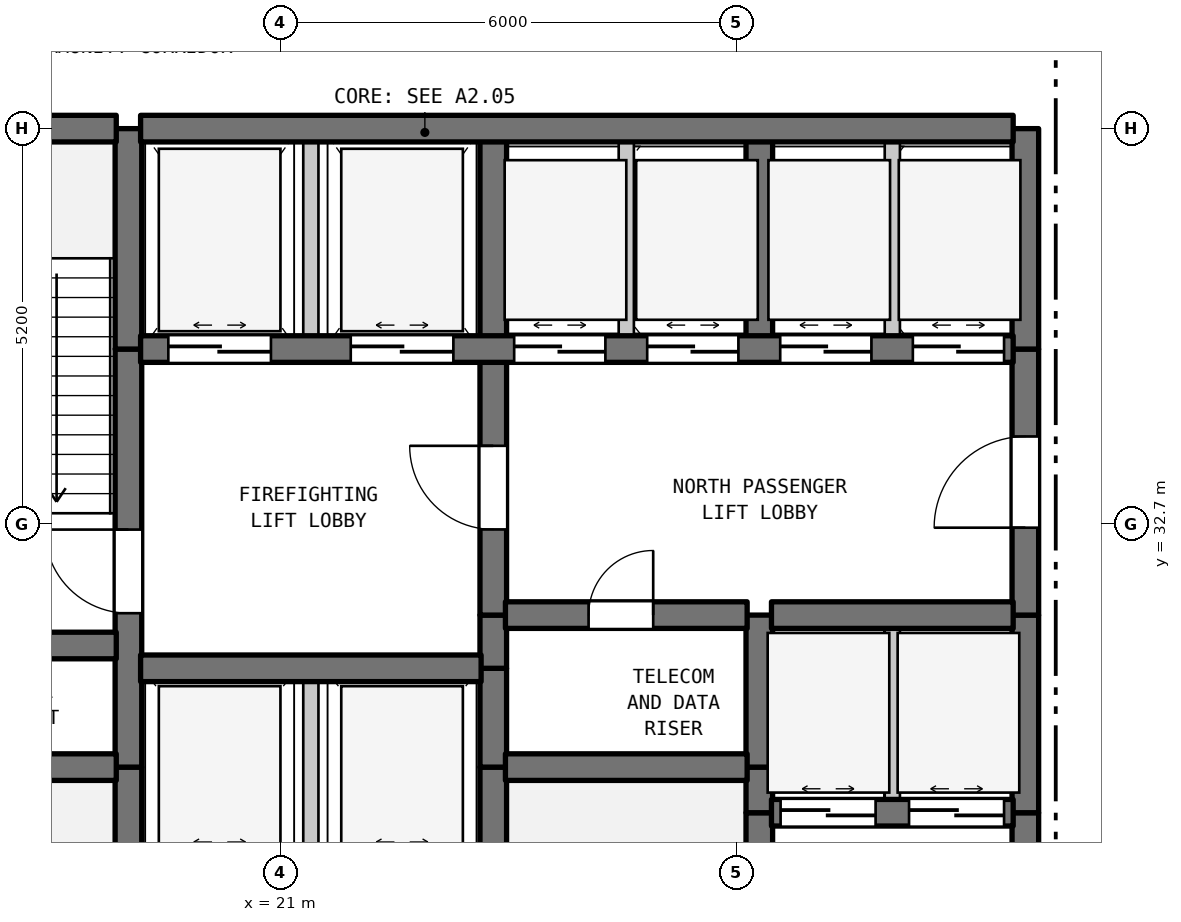
"""IFC4 building model, lengths in metres.
Left out: names, types, materials, properties, quantities, classifications, styles, units other than length and angle.
Written with IfcOpenShell. Run it as: python <this file> out.ifc"""

import sys

from ifc_helpers import new_model, si_unit, direction, frame, frame_2d, origin, place, context, subcontext, project, spatial, rectangle, extrude, element, fill, save


model = new_model("IFC4")
c1 = context("Model", 3, precision=1e-05, world=origin(), true_north=direction((0.0, 1.0)))
c2 = subcontext(c1, "Body", "Model", "MODEL_VIEW")
j1 = project(units=[si_unit("LENGTHUNIT", "METRE"), si_unit("PLANEANGLEUNIT", "RADIAN")], contexts=[c1])
p1 = place(None, origin())
s1 = spatial("IfcSite", under=j1, at=p1, CompositionType="ELEMENT")
p2 = place(p1, origin())
s2 = spatial("IfcBuilding", under=s1, at=p2, CompositionType="ELEMENT")
p3 = place(p2, frame((0.0, 0.0, 19.0)))
s3 = spatial("IfcBuildingStorey", under=s2, at=p3, CompositionType="ELEMENT", Elevation=19.0)
p4 = place(p3, frame((19.0, 28.2, 0.0), z_axis=(0.0, 0.0, 1.0), x_axis=(0.0, 1.0, 0.0)))
e1 = element("IfcWall", 1, at=p4, inside=s3, PredefinedType="SHEAR", context=c2, shape_type="SweptSolid", body=[
    extrude(rectangle(XDim=1.3, YDim=0.35, at=frame_2d((0.65, 0.0))), origin(), (0.0, 0.0, 1.0), 4.685),
])
p5 = place(p3, frame((19.0, 29.5, 0.0), z_axis=(0.0, 0.0, 1.0), x_axis=(0.0, 1.0, 0.0)))
e2 = element("IfcWall", 2, at=p5, inside=s3, PredefinedType="SHEAR", context=c2, shape_type="SweptSolid", body=[
    extrude(rectangle(XDim=5.5, YDim=0.35, at=frame_2d((2.75, 0.0))), origin(), (0.0, 0.0, 1.0), 4.685),
])
p6 = place(p5, frame((2.025, 0.0, 0.0)))
e3 = element("IfcOpeningElement", 3, at=p6, cuts=e2, PredefinedType="OPENING", context=c2, shape_type="SweptSolid", body=[
    extrude(rectangle(XDim=1.1, YDim=2.15, at=frame_2d((0.55, 1.075))), frame((0.0, 0.185, 0.0), z_axis=(0.0, -1.0, 0.0), x_axis=(1.0, 0.0, 0.0)), (0.0, 0.0, 1.0), 0.37),
])
p7 = place(p3, frame((19.0, 35.0, 0.0), z_axis=(0.0, 0.0, 1.0), x_axis=(0.0, 1.0, 0.0)))
e4 = element("IfcWall", 4, at=p7, inside=s3, PredefinedType="SHEAR", context=c2, shape_type="SweptSolid", body=[
    extrude(rectangle(XDim=2.9, YDim=0.35, at=frame_2d((1.45, 0.0))), origin(), (0.0, 0.0, 1.0), 4.685),
])
p8 = place(p3, frame((21.4, 28.2, 0.0), z_axis=(0.0, 0.0, 1.0), x_axis=(0.0, 1.0, 0.0)))
e5 = element("IfcWall", 5, at=p8, inside=s3, PredefinedType="STANDARD", context=c2, shape_type="SweptSolid", body=[
    extrude(rectangle(XDim=2.6, YDim=0.2, at=frame_2d((1.3, 0.0))), origin(), (0.0, 0.0, 1.0), 4.685),
])
p9 = place(p3, frame((21.4, 35.0, 0.0), z_axis=(0.0, 0.0, 1.0), x_axis=(0.0, 1.0, 0.0)))
e6 = element("IfcWall", 6, at=p9, inside=s3, PredefinedType="STANDARD", context=c2, shape_type="SweptSolid", body=[
    extrude(rectangle(XDim=2.9, YDim=0.2, at=frame_2d((1.45, 0.0))), origin(), (0.0, 0.0, 1.0), 4.685),
])
for number, where, z_axis, x_axis in (
    (7, (23.8, 28.2, 0.0), (0.0, 0.0, 1.0), (0.0, 1.0, 0.0)),
    (8, (23.8, 29.5, 0.0), (0.0, 0.0, 1.0), (0.0, 1.0, 0.0)),
):
    element("IfcWall", number, at=place(p3, frame(where, z_axis=z_axis, x_axis=x_axis)), inside=s3, PredefinedType="SHEAR", context=c2, shape_type="SweptSolid", body=[
        extrude(rectangle(XDim=1.3, YDim=0.35, at=frame_2d((0.65, 0.0))), origin(), (0.0, 0.0, 1.0), 4.685),
    ])
p10 = place(p3, frame((23.8, 30.8, 0.0), z_axis=(0.0, 0.0, 1.0), x_axis=(0.0, 1.0, 0.0)))
e9 = element("IfcWall", 9, at=p10, inside=s3, PredefinedType="SHEAR", context=c2, shape_type="SweptSolid", body=[
    extrude(rectangle(XDim=0.7, YDim=0.35, at=frame_2d((0.35, 0.0))), origin(), (0.0, 0.0, 1.0), 4.685),
])
p11 = place(p3, frame((23.8, 31.5, 0.0), z_axis=(0.0, 0.0, 1.0), x_axis=(0.0, 1.0, 0.0)))
e10 = element("IfcWall", 10, at=p11, inside=s3, PredefinedType="SHEAR", context=c2, shape_type="SweptSolid", body=[
    extrude(rectangle(XDim=3.5, YDim=0.35, at=frame_2d((1.75, 0.0))), origin(), (0.0, 0.0, 1.0), 4.685),
])
p12 = place(p11, frame((1.127, 0.0, 0.0)))
e11 = element("IfcOpeningElement", 11, at=p12, cuts=e10, PredefinedType="OPENING", context=c2, shape_type="SweptSolid", body=[
    extrude(rectangle(XDim=1.1, YDim=2.15, at=frame_2d((0.55, 1.075))), frame((0.0, 0.185, 0.0), z_axis=(0.0, -1.0, 0.0), x_axis=(1.0, 0.0, 0.0)), (0.0, 0.0, 1.0), 0.37),
])
p13 = place(p3, frame((23.8, 35.0, 0.0), z_axis=(0.0, 0.0, 1.0), x_axis=(0.0, 1.0, 0.0)))
e12 = element("IfcWall", 12, at=p13, inside=s3, PredefinedType="SHEAR", context=c2, shape_type="SweptSolid", body=[
    extrude(rectangle(XDim=2.9, YDim=0.35, at=frame_2d((1.45, 0.0))), origin(), (0.0, 0.0, 1.0), 4.685),
])
p14 = place(p3, frame((25.55, 35.0, 0.0), z_axis=(0.0, 0.0, 1.0), x_axis=(0.0, 1.0, 0.0)))
e13 = element("IfcWall", 13, at=p14, inside=s3, PredefinedType="STANDARD", context=c2, shape_type="SweptSolid", body=[
    extrude(rectangle(XDim=2.9, YDim=0.2, at=frame_2d((1.45, 0.0))), origin(), (0.0, 0.0, 1.0), 4.685),
])
p15 = place(p3, frame((27.3, 25.6, 0.0), z_axis=(0.0, 0.0, 1.0), x_axis=(0.0, 1.0, 0.0)))
e14 = element("IfcWall", 14, at=p15, inside=s3, PredefinedType="SHEAR", context=c2, shape_type="SweptSolid", body=[
    extrude(rectangle(XDim=3.3, YDim=0.35, at=frame_2d((1.65, 0.0))), origin(), (0.0, 0.0, 1.0), 4.685),
])
p16 = place(p3, frame((27.3, 28.9, 0.0), z_axis=(0.0, 0.0, 1.0), x_axis=(0.0, 1.0, 0.0)))
e15 = element("IfcWall", 15, at=p16, inside=s3, PredefinedType="SHEAR", context=c2, shape_type="SweptSolid", body=[
    extrude(rectangle(XDim=0.6, YDim=0.35, at=frame_2d((0.3, 0.0))), origin(), (0.0, 0.0, 1.0), 4.685),
])
p17 = place(p3, frame((27.3, 29.5, 0.0), z_axis=(0.0, 0.0, 1.0), x_axis=(0.0, 1.0, 0.0)))
e16 = element("IfcWall", 16, at=p17, inside=s3, PredefinedType="SHEAR", context=c2, shape_type="SweptSolid", body=[
    extrude(rectangle(XDim=2.0, YDim=0.35, at=frame_2d((1.0, 0.0))), origin(), (0.0, 0.0, 1.0), 4.685),
])
p18 = place(p3, frame((27.3, 35.0, 0.0), z_axis=(0.0, 0.0, 1.0), x_axis=(0.0, 1.0, 0.0)))
e17 = element("IfcWall", 17, at=p18, inside=s3, PredefinedType="SHEAR", context=c2, shape_type="SweptSolid", body=[
    extrude(rectangle(XDim=2.9, YDim=0.35, at=frame_2d((1.45, 0.0))), origin(), (0.0, 0.0, 1.0), 4.685),
])
p19 = place(p3, frame((29.05, 28.9, 0.0), z_axis=(0.0, 0.0, 1.0), x_axis=(0.0, 1.0, 0.0)))
e18 = element("IfcWall", 18, at=p19, inside=s3, PredefinedType="STANDARD", context=c2, shape_type="SweptSolid", body=[
    extrude(rectangle(XDim=2.6, YDim=0.2, at=frame_2d((1.3, 0.0))), origin(), (0.0, 0.0, 1.0), 4.685),
])
p20 = place(p3, frame((29.05, 35.0, 0.0), z_axis=(0.0, 0.0, 1.0), x_axis=(0.0, 1.0, 0.0)))
e19 = element("IfcWall", 19, at=p20, inside=s3, PredefinedType="STANDARD", context=c2, shape_type="SweptSolid", body=[
    extrude(rectangle(XDim=2.9, YDim=0.2, at=frame_2d((1.45, 0.0))), origin(), (0.0, 0.0, 1.0), 4.685),
])
p21 = place(p3, frame((30.8, 25.6, 0.0), z_axis=(0.0, 0.0, 1.0), x_axis=(0.0, 1.0, 0.0)))
e20 = element("IfcWall", 20, at=p21, inside=s3, PredefinedType="SHEAR", context=c2, shape_type="SweptSolid", body=[
    extrude(rectangle(XDim=3.3, YDim=0.35, at=frame_2d((1.65, 0.0))), origin(), (0.0, 0.0, 1.0), 4.685),
])
p22 = place(p21, frame((0.978, 0.0, 0.0)))
e21 = element("IfcOpeningElement", 21, at=p22, cuts=e20, PredefinedType="OPENING", context=c2, shape_type="SweptSolid", body=[
    extrude(rectangle(XDim=1.2, YDim=2.2, at=frame_2d((0.6, 1.1))), frame((0.0, 0.185, 0.0), z_axis=(0.0, -1.0, 0.0), x_axis=(1.0, 0.0, 0.0)), (0.0, 0.0, 1.0), 0.37),
])
p23 = place(p3, frame((30.8, 28.9, 0.0), z_axis=(0.0, 0.0, 1.0), x_axis=(0.0, 1.0, 0.0)))
e22 = element("IfcWall", 22, at=p23, inside=s3, PredefinedType="SHEAR", context=c2, shape_type="SweptSolid", body=[
    extrude(rectangle(XDim=2.6, YDim=0.35, at=frame_2d((1.3, 0.0))), origin(), (0.0, 0.0, 1.0), 4.685),
])
p24 = place(p3, frame((30.8, 31.5, 0.0), z_axis=(0.0, 0.0, 1.0), x_axis=(0.0, 1.0, 0.0)))
e23 = element("IfcWall", 23, at=p24, inside=s3, PredefinedType="SHEAR", context=c2, shape_type="SweptSolid", body=[
    extrude(rectangle(XDim=3.5, YDim=0.35, at=frame_2d((1.75, 0.0))), origin(), (0.0, 0.0, 1.0), 4.685),
])
p25 = place(p24, frame((1.15, 0.0, 0.0)))
e24 = element("IfcOpeningElement", 24, at=p25, cuts=e23, PredefinedType="OPENING", context=c2, shape_type="SweptSolid", body=[
    extrude(rectangle(XDim=1.2, YDim=2.2, at=frame_2d((0.6, 1.1))), frame((0.0, 0.185, 0.0), z_axis=(0.0, -1.0, 0.0), x_axis=(1.0, 0.0, 0.0)), (0.0, 0.0, 1.0), 0.37),
])
p26 = place(p3, frame((30.8, 35.0, 0.0), z_axis=(0.0, 0.0, 1.0), x_axis=(0.0, 1.0, 0.0)))
e25 = element("IfcWall", 25, at=p26, inside=s3, PredefinedType="SHEAR", context=c2, shape_type="SweptSolid", body=[
    extrude(rectangle(XDim=2.9, YDim=0.35, at=frame_2d((1.45, 0.0))), origin(), (0.0, 0.0, 1.0), 4.685),
])
p27 = place(p3, frame((27.46, 28.9, 0.0), z_axis=(0.0, 0.0, 1.0), x_axis=(1.0, 0.0, 0.0)))
e26 = element("IfcWall", 26, at=p27, inside=s3, PredefinedType="SHEAR", context=c2, shape_type="SweptSolid", body=[
    extrude(rectangle(XDim=3.18, YDim=0.35, at=frame_2d((1.59, 0.0))), origin(), (0.0, 0.0, 1.0), 4.685),
])
p28 = place(p27, frame((0.12, 0.0, 0.0)))
e27 = element("IfcOpeningElement", 27, at=p28, cuts=e26, PredefinedType="OPENING", context=c2, shape_type="SweptSolid", body=[
    extrude(rectangle(XDim=1.25, YDim=2.2, at=frame_2d((0.625, 1.1))), frame((0.0, 0.185, 0.0), z_axis=(0.0, -1.0, 0.0), x_axis=(1.0, 0.0, 0.0)), (0.0, 0.0, 1.0), 0.37),
])
p29 = place(p27, frame((1.81, 0.0, 0.0)))
e28 = element("IfcOpeningElement", 28, at=p29, cuts=e26, PredefinedType="OPENING", context=c2, shape_type="SweptSolid", body=[
    extrude(rectangle(XDim=1.25, YDim=2.2, at=frame_2d((0.625, 1.1))), frame((0.0, 0.185, 0.0), z_axis=(0.0, -1.0, 0.0), x_axis=(1.0, 0.0, 0.0)), (0.0, 0.0, 1.0), 0.37),
])
p30 = place(p3, frame((15.16, 29.5, 0.0), z_axis=(0.0, 0.0, 1.0), x_axis=(1.0, 0.0, 0.0)))
e29 = element("IfcWall", 29, at=p30, inside=s3, PredefinedType="SHEAR", context=c2, shape_type="SweptSolid", body=[
    extrude(rectangle(XDim=3.68, YDim=0.35, at=frame_2d((1.84, 0.0))), origin(), (0.0, 0.0, 1.0), 4.685),
])
p31 = place(p3, frame((23.96, 29.5, 0.0), z_axis=(0.0, 0.0, 1.0), x_axis=(1.0, 0.0, 0.0)))
e30 = element("IfcWall", 30, at=p31, inside=s3, PredefinedType="SHEAR", context=c2, shape_type="SweptSolid", body=[
    extrude(rectangle(XDim=3.18, YDim=0.35, at=frame_2d((1.59, 0.0))), origin(), (0.0, 0.0, 1.0), 4.685),
])
p32 = place(p3, frame((19.16, 30.8, 0.0), z_axis=(0.0, 0.0, 1.0), x_axis=(1.0, 0.0, 0.0)))
e31 = element("IfcWall", 31, at=p32, inside=s3, PredefinedType="SHEAR", context=c2, shape_type="SweptSolid", body=[
    extrude(rectangle(XDim=4.48, YDim=0.35, at=frame_2d((2.24, 0.0))), origin(), (0.0, 0.0, 1.0), 4.685),
])
p33 = place(p3, frame((15.16, 31.1, 0.0), z_axis=(0.0, 0.0, 1.0), x_axis=(1.0, 0.0, 0.0)))
e32 = element("IfcWall", 32, at=p33, inside=s3, PredefinedType="SHEAR", context=c2, shape_type="SweptSolid", body=[
    extrude(rectangle(XDim=3.68, YDim=0.35, at=frame_2d((1.84, 0.0))), origin(), (0.0, 0.0, 1.0), 4.685),
])
p34 = place(p3, frame((23.96, 31.5, 0.0), z_axis=(0.0, 0.0, 1.0), x_axis=(1.0, 0.0, 0.0)))
e33 = element("IfcWall", 33, at=p34, inside=s3, PredefinedType="SHEAR", context=c2, shape_type="SweptSolid", body=[
    extrude(rectangle(XDim=3.18, YDim=0.35, at=frame_2d((1.59, 0.0))), origin(), (0.0, 0.0, 1.0), 4.685),
])
p35 = place(p34, frame((1.094, 0.0, 0.0)))
e34 = element("IfcOpeningElement", 34, at=p35, cuts=e33, PredefinedType="OPENING", context=c2, shape_type="SweptSolid", body=[
    extrude(rectangle(XDim=0.85, YDim=2.1, at=frame_2d((0.425, 1.05))), frame((0.0, 0.185, 0.0), z_axis=(0.0, -1.0, 0.0), x_axis=(1.0, 0.0, 0.0)), (0.0, 0.0, 1.0), 0.37),
])
p36 = place(p3, frame((27.46, 31.5, 0.0), z_axis=(0.0, 0.0, 1.0), x_axis=(1.0, 0.0, 0.0)))
e35 = element("IfcWall", 35, at=p36, inside=s3, PredefinedType="SHEAR", context=c2, shape_type="SweptSolid", body=[
    extrude(rectangle(XDim=3.18, YDim=0.35, at=frame_2d((1.59, 0.0))), origin(), (0.0, 0.0, 1.0), 4.685),
])
p37 = place(p3, frame((19.16, 35.0, 0.0), z_axis=(0.0, 0.0, 1.0), x_axis=(1.0, 0.0, 0.0)))
e36 = element("IfcWall", 36, at=p37, inside=s3, PredefinedType="SHEAR", context=c2, shape_type="SweptSolid", body=[
    extrude(rectangle(XDim=11.48, YDim=0.35, at=frame_2d((5.74, 0.0))), origin(), (0.0, 0.0, 1.0), 4.685),
])
p38 = place(p37, frame((0.365, 0.0, 0.0)))
e37 = element("IfcOpeningElement", 37, at=p38, cuts=e36, PredefinedType="OPENING", context=c2, shape_type="SweptSolid", body=[
    extrude(rectangle(XDim=1.35, YDim=2.2, at=frame_2d((0.675, 1.1))), frame((0.0, 0.185, 0.0), z_axis=(0.0, -1.0, 0.0), x_axis=(1.0, 0.0, 0.0)), (0.0, 0.0, 1.0), 0.37),
])
p39 = place(p37, frame((2.765, 0.0, 0.0)))
e38 = element("IfcOpeningElement", 38, at=p39, cuts=e36, PredefinedType="OPENING", context=c2, shape_type="SweptSolid", body=[
    extrude(rectangle(XDim=1.35, YDim=2.2, at=frame_2d((0.675, 1.1))), frame((0.0, 0.185, 0.0), z_axis=(0.0, -1.0, 0.0), x_axis=(1.0, 0.0, 0.0)), (0.0, 0.0, 1.0), 0.37),
])
p40 = place(p37, frame((4.915, 0.0, 0.0)))
e39 = element("IfcOpeningElement", 39, at=p40, cuts=e36, PredefinedType="OPENING", context=c2, shape_type="SweptSolid", body=[
    extrude(rectangle(XDim=1.2, YDim=2.2, at=frame_2d((0.6, 1.1))), frame((0.0, 0.185, 0.0), z_axis=(0.0, -1.0, 0.0), x_axis=(1.0, 0.0, 0.0)), (0.0, 0.0, 1.0), 0.37),
])
p41 = place(p37, frame((6.665, 0.0, 0.0)))
e40 = element("IfcOpeningElement", 40, at=p41, cuts=e36, PredefinedType="OPENING", context=c2, shape_type="SweptSolid", body=[
    extrude(rectangle(XDim=1.2, YDim=2.2, at=frame_2d((0.6, 1.1))), frame((0.0, 0.185, 0.0), z_axis=(0.0, -1.0, 0.0), x_axis=(1.0, 0.0, 0.0)), (0.0, 0.0, 1.0), 0.37),
])
p42 = place(p37, frame((8.415, 0.0, 0.0)))
e41 = element("IfcOpeningElement", 41, at=p42, cuts=e36, PredefinedType="OPENING", context=c2, shape_type="SweptSolid", body=[
    extrude(rectangle(XDim=1.2, YDim=2.2, at=frame_2d((0.6, 1.1))), frame((0.0, 0.185, 0.0), z_axis=(0.0, -1.0, 0.0), x_axis=(1.0, 0.0, 0.0)), (0.0, 0.0, 1.0), 0.37),
])
p43 = place(p37, frame((10.16, 0.0, 0.0)))
e42 = element("IfcOpeningElement", 42, at=p43, cuts=e36, PredefinedType="OPENING", context=c2, shape_type="SweptSolid", body=[
    extrude(rectangle(XDim=1.2, YDim=2.2, at=frame_2d((0.6, 1.1))), frame((0.0, 0.185, 0.0), z_axis=(0.0, -1.0, 0.0), x_axis=(1.0, 0.0, 0.0)), (0.0, 0.0, 1.0), 0.37),
])
p44 = place(p3, frame((15.16, 37.9, 0.0), z_axis=(0.0, 0.0, 1.0), x_axis=(1.0, 0.0, 0.0)))
e43 = element("IfcWall", 43, at=p44, inside=s3, PredefinedType="SHEAR", context=c2, shape_type="SweptSolid", body=[
    extrude(rectangle(XDim=3.68, YDim=0.35, at=frame_2d((1.84, 0.0))), origin(), (0.0, 0.0, 1.0), 4.685),
])
p45 = place(p3, frame((19.16, 37.9, 0.0), z_axis=(0.0, 0.0, 1.0), x_axis=(1.0, 0.0, 0.0)))
e44 = element("IfcWall", 44, at=p45, inside=s3, PredefinedType="SHEAR", context=c2, shape_type="SweptSolid", body=[
    extrude(rectangle(XDim=11.48, YDim=0.35, at=frame_2d((5.74, 0.0))), origin(), (0.0, 0.0, 1.0), 4.685),
])
p46 = place(p6, origin())
e45 = element("IfcDoor", 45, at=p46, inside=s3, OperationType="SINGLE_SWING_RIGHT", PredefinedType="DOOR", context=c2, shape_type="SweptSolid", body=[
    extrude(rectangle(XDim=1.1, YDim=2.15, at=frame_2d((0.55, 1.075))), frame((0.0, 0.025, 0.0), z_axis=(0.0, -1.0, 0.0), x_axis=(1.0, 0.0, 0.0)), (0.0, 0.0, 1.0), 0.05),
])
fill(e3, e45)
p47 = place(p12, origin())
e46 = element("IfcDoor", 46, at=p47, inside=s3, OperationType="SINGLE_SWING_RIGHT", PredefinedType="DOOR", context=c2, shape_type="SweptSolid", body=[
    extrude(rectangle(XDim=1.1, YDim=2.15, at=frame_2d((0.55, 1.075))), frame((0.0, 0.025, 0.0), z_axis=(0.0, -1.0, 0.0), x_axis=(1.0, 0.0, 0.0)), (0.0, 0.0, 1.0), 0.05),
])
fill(e11, e46)
p48 = place(p25, origin())
e47 = element("IfcDoor", 47, at=p48, inside=s3, OperationType="SINGLE_SWING_LEFT", PredefinedType="DOOR", context=c2, shape_type="SweptSolid", body=[
    extrude(rectangle(XDim=1.2, YDim=2.2, at=frame_2d((0.6, 1.1))), frame((0.0, 0.025, 0.0), z_axis=(0.0, -1.0, 0.0), x_axis=(1.0, 0.0, 0.0)), (0.0, 0.0, 1.0), 0.05),
])
fill(e24, e47)
p49 = place(p28, origin())
e48 = element("IfcDoor", 48, at=p49, inside=s3, OperationType="DOUBLE_DOOR_SLIDING", PredefinedType="DOOR", context=c2, shape_type="SweptSolid", body=[
    extrude(rectangle(XDim=1.25, YDim=2.2, at=frame_2d((0.625, 1.1))), frame((0.0, 0.025, 0.0), z_axis=(0.0, -1.0, 0.0), x_axis=(1.0, 0.0, 0.0)), (0.0, 0.0, 1.0), 0.05),
])
fill(e27, e48)
p50 = place(p29, origin())
e49 = element("IfcDoor", 49, at=p50, inside=s3, OperationType="DOUBLE_DOOR_SLIDING", PredefinedType="DOOR", context=c2, shape_type="SweptSolid", body=[
    extrude(rectangle(XDim=1.25, YDim=2.2, at=frame_2d((0.625, 1.1))), frame((0.0, 0.025, 0.0), z_axis=(0.0, -1.0, 0.0), x_axis=(1.0, 0.0, 0.0)), (0.0, 0.0, 1.0), 0.05),
])
fill(e28, e49)
p51 = place(p35, origin())
e50 = element("IfcDoor", 50, at=p51, inside=s3, OperationType="SINGLE_SWING_RIGHT", PredefinedType="DOOR", context=c2, shape_type="SweptSolid", body=[
    extrude(rectangle(XDim=0.85, YDim=2.1, at=frame_2d((0.425, 1.05))), frame((0.0, 0.025, 0.0), z_axis=(0.0, -1.0, 0.0), x_axis=(1.0, 0.0, 0.0)), (0.0, 0.0, 1.0), 0.05),
])
fill(e34, e50)
p52 = place(p38, origin())
e51 = element("IfcDoor", 51, at=p52, inside=s3, OperationType="DOUBLE_DOOR_SLIDING", PredefinedType="DOOR", context=c2, shape_type="SweptSolid", body=[
    extrude(rectangle(XDim=1.35, YDim=2.2, at=frame_2d((0.675, 1.1))), frame((0.0, 0.025, 0.0), z_axis=(0.0, -1.0, 0.0), x_axis=(1.0, 0.0, 0.0)), (0.0, 0.0, 1.0), 0.05),
])
fill(e37, e51)
p53 = place(p39, origin())
e52 = element("IfcDoor", 52, at=p53, inside=s3, OperationType="DOUBLE_DOOR_SLIDING", PredefinedType="DOOR", context=c2, shape_type="SweptSolid", body=[
    extrude(rectangle(XDim=1.35, YDim=2.2, at=frame_2d((0.675, 1.1))), frame((0.0, 0.025, 0.0), z_axis=(0.0, -1.0, 0.0), x_axis=(1.0, 0.0, 0.0)), (0.0, 0.0, 1.0), 0.05),
])
fill(e38, e52)
p54 = place(p40, origin())
e53 = element("IfcDoor", 53, at=p54, inside=s3, OperationType="DOUBLE_DOOR_SLIDING", PredefinedType="DOOR", context=c2, shape_type="SweptSolid", body=[
    extrude(rectangle(XDim=1.2, YDim=2.2, at=frame_2d((0.6, 1.1))), frame((0.0, 0.025, 0.0), z_axis=(0.0, -1.0, 0.0), x_axis=(1.0, 0.0, 0.0)), (0.0, 0.0, 1.0), 0.05),
])
fill(e39, e53)
p55 = place(p41, origin())
e54 = element("IfcDoor", 54, at=p55, inside=s3, OperationType="DOUBLE_DOOR_SLIDING", PredefinedType="DOOR", context=c2, shape_type="SweptSolid", body=[
    extrude(rectangle(XDim=1.2, YDim=2.2, at=frame_2d((0.6, 1.1))), frame((0.0, 0.025, 0.0), z_axis=(0.0, -1.0, 0.0), x_axis=(1.0, 0.0, 0.0)), (0.0, 0.0, 1.0), 0.05),
])
fill(e40, e54)
p56 = place(p42, origin())
e55 = element("IfcDoor", 55, at=p56, inside=s3, OperationType="DOUBLE_DOOR_SLIDING", PredefinedType="DOOR", context=c2, shape_type="SweptSolid", body=[
    extrude(rectangle(XDim=1.2, YDim=2.2, at=frame_2d((0.6, 1.1))), frame((0.0, 0.025, 0.0), z_axis=(0.0, -1.0, 0.0), x_axis=(1.0, 0.0, 0.0)), (0.0, 0.0, 1.0), 0.05),
])
fill(e41, e55)
p57 = place(p43, origin())
e56 = element("IfcDoor", 56, at=p57, inside=s3, OperationType="DOUBLE_DOOR_SLIDING", PredefinedType="DOOR", context=c2, shape_type="SweptSolid", body=[
    extrude(rectangle(XDim=1.2, YDim=2.2, at=frame_2d((0.6, 1.1))), frame((0.0, 0.025, 0.0), z_axis=(0.0, -1.0, 0.0), x_axis=(1.0, 0.0, 0.0)), (0.0, 0.0, 1.0), 0.05),
])
fill(e42, e56)
save(model, sys.argv[1])
